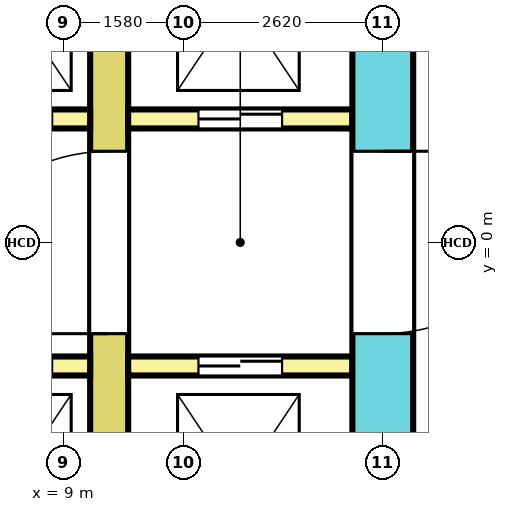
"""IFC4 building model, lengths in metres.
Left out: names, types, materials, properties, quantities, classifications, styles, units other than length and angle.
Written with IfcOpenShell. Run it as: python <this file> out.ifc"""

import sys

from ifc_helpers import new_model, si_unit, direction, frame, frame_2d, origin, place, context, subcontext, project, spatial, rectangle, extrude, element, fill, save


model = new_model("IFC4")
c1 = context("Model", 3, precision=1e-05, world=origin(), true_north=direction((0.0, 1.0)))
c2 = subcontext(c1, "Body", "Model", "MODEL_VIEW")
j1 = project(units=[si_unit("LENGTHUNIT", "METRE"), si_unit("PLANEANGLEUNIT", "RADIAN")], contexts=[c1])
p1 = place(None, origin())
s1 = spatial("IfcSite", under=j1, at=p1, CompositionType="ELEMENT")
p2 = place(p1, origin())
s2 = spatial("IfcBuilding", under=s1, at=p2, CompositionType="ELEMENT")
p3 = place(p2, frame((0.0, 0.0, 107.2)))
s3 = spatial("IfcBuildingStorey", under=s2, at=p3, CompositionType="ELEMENT", Elevation=107.2)
p4 = place(p3, frame((13.2, -10.4, 0.0), z_axis=(0.0, 0.0, 1.0), x_axis=(0.0, 1.0, 0.0)))
e1 = element("IfcWall", 1, at=p4, inside=s3, PredefinedType="SHEAR", context=c2, shape_type="SweptSolid", body=[
    extrude(rectangle(XDim=20.8, YDim=0.8, at=frame_2d((10.4, 0.0))), origin(), (0.0, 0.0, 1.0), 5.7),
])
p5 = place(p4, frame((9.2, 0.0, 0.0)))
e2 = element("IfcOpeningElement", 2, at=p5, cuts=e1, PredefinedType="OPENING", context=c2, shape_type="SweptSolid", body=[
    extrude(rectangle(XDim=2.4, YDim=2.1, at=frame_2d((1.2, 1.05))), frame((0.0, 0.41, 0.0), z_axis=(0.0, -1.0, 0.0), x_axis=(1.0, 0.0, 0.0)), (0.0, 0.0, 1.0), 0.82),
])
p6 = place(p4, frame((16.1, 0.0, 0.0)))
e3 = element("IfcOpeningElement", 3, at=p6, cuts=e1, PredefinedType="OPENING", context=c2, shape_type="SweptSolid", body=[
    extrude(rectangle(XDim=1.2, YDim=2.1, at=frame_2d((0.6, 1.05))), frame((0.0, 0.41, 0.0), z_axis=(0.0, -1.0, 0.0), x_axis=(1.0, 0.0, 0.0)), (0.0, 0.0, 1.0), 0.82),
])
p7 = place(p4, frame((2.869, 0.0, 0.0)))
e4 = element("IfcOpeningElement", 4, at=p7, cuts=e1, PredefinedType="OPENING", context=c2, shape_type="SweptSolid", body=[
    extrude(rectangle(XDim=1.0, YDim=2.1, at=frame_2d((0.5, 1.05))), frame((0.0, 0.41, 0.0), z_axis=(0.0, -1.0, 0.0), x_axis=(1.0, 0.0, 0.0)), (0.0, 0.0, 1.0), 0.82),
])
p8 = place(p4, frame((4.331, 0.0, 0.0)))
e5 = element("IfcOpeningElement", 5, at=p8, cuts=e1, PredefinedType="OPENING", context=c2, shape_type="SweptSolid", body=[
    extrude(rectangle(XDim=1.0, YDim=2.1, at=frame_2d((0.5, 1.05))), frame((0.0, 0.41, 0.0), z_axis=(0.0, -1.0, 0.0), x_axis=(1.0, 0.0, 0.0)), (0.0, 0.0, 1.0), 0.82),
])
p9 = place(p3, frame((9.6, -7.7, 0.0), z_axis=(0.0, 0.0, 1.0), x_axis=(0.0, 1.0, 0.0)))
e6 = element("IfcWall", 6, at=p9, inside=s3, PredefinedType="SHEAR", context=c2, shape_type="SweptSolid", body=[
    extrude(rectangle(XDim=15.4, YDim=0.5, at=frame_2d((7.7, 0.0))), origin(), (0.0, 0.0, 1.0), 5.7),
])
p10 = place(p9, frame((6.5, 0.0, 0.0)))
e7 = element("IfcOpeningElement", 7, at=p10, cuts=e6, PredefinedType="OPENING", context=c2, shape_type="SweptSolid", body=[
    extrude(rectangle(XDim=2.4, YDim=2.1, at=frame_2d((1.2, 1.05))), frame((0.0, 0.26, 0.0), z_axis=(0.0, -1.0, 0.0), x_axis=(1.0, 0.0, 0.0)), (0.0, 0.0, 1.0), 0.52),
])
p11 = place(p9, frame((13.4, 0.0, 0.0)))
e8 = element("IfcOpeningElement", 8, at=p11, cuts=e6, PredefinedType="OPENING", context=c2, shape_type="SweptSolid", body=[
    extrude(rectangle(XDim=1.2, YDim=2.1, at=frame_2d((0.6, 1.05))), frame((0.0, 0.26, 0.0), z_axis=(0.0, -1.0, 0.0), x_axis=(1.0, 0.0, 0.0)), (0.0, 0.0, 1.0), 0.52),
])
p12 = place(p9, frame((0.9, 0.0, 0.0)))
e9 = element("IfcOpeningElement", 9, at=p12, cuts=e6, PredefinedType="OPENING", context=c2, shape_type="SweptSolid", body=[
    extrude(rectangle(XDim=1.0, YDim=2.1, at=frame_2d((0.5, 1.05))), frame((0.0, 0.26, 0.0), z_axis=(0.0, -1.0, 0.0), x_axis=(1.0, 0.0, 0.0)), (0.0, 0.0, 1.0), 0.52),
])
p13 = place(p3, frame((-9.35, 1.625, 0.0), z_axis=(0.0, 0.0, 1.0), x_axis=(1.0, 0.0, 0.0)))
e10 = element("IfcWall", 10, at=p13, inside=s3, PredefinedType="SOLIDWALL", context=c2, shape_type="SweptSolid", body=[
    extrude(rectangle(XDim=18.7, YDim=0.25, at=frame_2d((9.35, 0.0))), origin(), (0.0, 0.0, 1.0), 5.7),
])
p14 = place(p13, frame((0.5, 0.0, 0.0)))
e11 = element("IfcOpeningElement", 11, at=p14, cuts=e10, PredefinedType="OPENING", context=c2, shape_type="SweptSolid", body=[
    extrude(rectangle(XDim=1.1, YDim=2.1, at=frame_2d((0.55, 1.05))), frame((0.0, 0.135, 0.0), z_axis=(0.0, -1.0, 0.0), x_axis=(1.0, 0.0, 0.0)), (0.0, 0.0, 1.0), 0.27),
])
p15 = place(p13, frame((2.85, 0.0, 0.0)))
e12 = element("IfcOpeningElement", 12, at=p15, cuts=e10, PredefinedType="OPENING", context=c2, shape_type="SweptSolid", body=[
    extrude(rectangle(XDim=1.1, YDim=2.1, at=frame_2d((0.55, 1.05))), frame((0.0, 0.135, 0.0), z_axis=(0.0, -1.0, 0.0), x_axis=(1.0, 0.0, 0.0)), (0.0, 0.0, 1.0), 0.27),
])
p16 = place(p13, frame((5.15, 0.0, 0.0)))
e13 = element("IfcOpeningElement", 13, at=p16, cuts=e10, PredefinedType="OPENING", context=c2, shape_type="SweptSolid", body=[
    extrude(rectangle(XDim=1.1, YDim=2.1, at=frame_2d((0.55, 1.05))), frame((0.0, 0.135, 0.0), z_axis=(0.0, -1.0, 0.0), x_axis=(1.0, 0.0, 0.0)), (0.0, 0.0, 1.0), 0.27),
])
p17 = place(p13, frame((7.65, 0.0, 0.0)))
e14 = element("IfcOpeningElement", 14, at=p17, cuts=e10, PredefinedType="OPENING", context=c2, shape_type="SweptSolid", body=[
    extrude(rectangle(XDim=1.1, YDim=2.1, at=frame_2d((0.55, 1.05))), frame((0.0, 0.135, 0.0), z_axis=(0.0, -1.0, 0.0), x_axis=(1.0, 0.0, 0.0)), (0.0, 0.0, 1.0), 0.27),
])
p18 = place(p13, frame((9.95, 0.0, 0.0)))
e15 = element("IfcOpeningElement", 15, at=p18, cuts=e10, PredefinedType="OPENING", context=c2, shape_type="SweptSolid", body=[
    extrude(rectangle(XDim=1.1, YDim=2.1, at=frame_2d((0.55, 1.05))), frame((0.0, 0.135, 0.0), z_axis=(0.0, -1.0, 0.0), x_axis=(1.0, 0.0, 0.0)), (0.0, 0.0, 1.0), 0.27),
])
p19 = place(p13, frame((12.4, 0.0, 0.0)))
e16 = element("IfcOpeningElement", 16, at=p19, cuts=e10, PredefinedType="OPENING", context=c2, shape_type="SweptSolid", body=[
    extrude(rectangle(XDim=1.1, YDim=2.1, at=frame_2d((0.55, 1.05))), frame((0.0, 0.135, 0.0), z_axis=(0.0, -1.0, 0.0), x_axis=(1.0, 0.0, 0.0)), (0.0, 0.0, 1.0), 0.27),
])
p20 = place(p13, frame((14.8, 0.0, 0.0)))
e17 = element("IfcOpeningElement", 17, at=p20, cuts=e10, PredefinedType="OPENING", context=c2, shape_type="SweptSolid", body=[
    extrude(rectangle(XDim=1.1, YDim=2.1, at=frame_2d((0.55, 1.05))), frame((0.0, 0.135, 0.0), z_axis=(0.0, -1.0, 0.0), x_axis=(1.0, 0.0, 0.0)), (0.0, 0.0, 1.0), 0.27),
])
p21 = place(p13, frame((17.1, 0.0, 0.0)))
e18 = element("IfcOpeningElement", 18, at=p21, cuts=e10, PredefinedType="OPENING", context=c2, shape_type="SweptSolid", body=[
    extrude(rectangle(XDim=1.1, YDim=2.1, at=frame_2d((0.55, 1.05))), frame((0.0, 0.135, 0.0), z_axis=(0.0, -1.0, 0.0), x_axis=(1.0, 0.0, 0.0)), (0.0, 0.0, 1.0), 0.27),
])
p22 = place(p3, frame((9.85, 1.625, 0.0), z_axis=(0.0, 0.0, 1.0), x_axis=(1.0, 0.0, 0.0)))
e19 = element("IfcWall", 19, at=p22, inside=s3, PredefinedType="SOLIDWALL", context=c2, shape_type="SweptSolid", body=[
    extrude(rectangle(XDim=2.95, YDim=0.25, at=frame_2d((1.475, 0.0))), origin(), (0.0, 0.0, 1.0), 5.7),
])
p23 = place(p22, frame((0.925, 0.0, 0.0)))
e20 = element("IfcOpeningElement", 20, at=p23, cuts=e19, PredefinedType="OPENING", context=c2, shape_type="SweptSolid", body=[
    extrude(rectangle(XDim=1.1, YDim=2.1, at=frame_2d((0.55, 1.05))), frame((0.0, 0.135, 0.0), z_axis=(0.0, -1.0, 0.0), x_axis=(1.0, 0.0, 0.0)), (0.0, 0.0, 1.0), 0.27),
])
p24 = place(p3, frame((-9.35, -1.625, 0.0), z_axis=(0.0, 0.0, 1.0), x_axis=(1.0, 0.0, 0.0)))
e21 = element("IfcWall", 21, at=p24, inside=s3, PredefinedType="SOLIDWALL", context=c2, shape_type="SweptSolid", body=[
    extrude(rectangle(XDim=18.7, YDim=0.25, at=frame_2d((9.35, 0.0))), origin(), (0.0, 0.0, 1.0), 5.7),
])
p25 = place(p24, frame((0.5, 0.0, 0.0)))
e22 = element("IfcOpeningElement", 22, at=p25, cuts=e21, PredefinedType="OPENING", context=c2, shape_type="SweptSolid", body=[
    extrude(rectangle(XDim=1.1, YDim=2.1, at=frame_2d((0.55, 1.05))), frame((0.0, 0.135, 0.0), z_axis=(0.0, -1.0, 0.0), x_axis=(1.0, 0.0, 0.0)), (0.0, 0.0, 1.0), 0.27),
])
p26 = place(p24, frame((2.85, 0.0, 0.0)))
e23 = element("IfcOpeningElement", 23, at=p26, cuts=e21, PredefinedType="OPENING", context=c2, shape_type="SweptSolid", body=[
    extrude(rectangle(XDim=1.1, YDim=2.1, at=frame_2d((0.55, 1.05))), frame((0.0, 0.135, 0.0), z_axis=(0.0, -1.0, 0.0), x_axis=(1.0, 0.0, 0.0)), (0.0, 0.0, 1.0), 0.27),
])
p27 = place(p24, frame((5.15, 0.0, 0.0)))
e24 = element("IfcOpeningElement", 24, at=p27, cuts=e21, PredefinedType="OPENING", context=c2, shape_type="SweptSolid", body=[
    extrude(rectangle(XDim=1.1, YDim=2.1, at=frame_2d((0.55, 1.05))), frame((0.0, 0.135, 0.0), z_axis=(0.0, -1.0, 0.0), x_axis=(1.0, 0.0, 0.0)), (0.0, 0.0, 1.0), 0.27),
])
p28 = place(p24, frame((7.65, 0.0, 0.0)))
e25 = element("IfcOpeningElement", 25, at=p28, cuts=e21, PredefinedType="OPENING", context=c2, shape_type="SweptSolid", body=[
    extrude(rectangle(XDim=1.1, YDim=2.1, at=frame_2d((0.55, 1.05))), frame((0.0, 0.135, 0.0), z_axis=(0.0, -1.0, 0.0), x_axis=(1.0, 0.0, 0.0)), (0.0, 0.0, 1.0), 0.27),
])
p29 = place(p24, frame((9.95, 0.0, 0.0)))
e26 = element("IfcOpeningElement", 26, at=p29, cuts=e21, PredefinedType="OPENING", context=c2, shape_type="SweptSolid", body=[
    extrude(rectangle(XDim=1.1, YDim=2.1, at=frame_2d((0.55, 1.05))), frame((0.0, 0.135, 0.0), z_axis=(0.0, -1.0, 0.0), x_axis=(1.0, 0.0, 0.0)), (0.0, 0.0, 1.0), 0.27),
])
p30 = place(p24, frame((12.4, 0.0, 0.0)))
e27 = element("IfcOpeningElement", 27, at=p30, cuts=e21, PredefinedType="OPENING", context=c2, shape_type="SweptSolid", body=[
    extrude(rectangle(XDim=1.1, YDim=2.1, at=frame_2d((0.55, 1.05))), frame((0.0, 0.135, 0.0), z_axis=(0.0, -1.0, 0.0), x_axis=(1.0, 0.0, 0.0)), (0.0, 0.0, 1.0), 0.27),
])
p31 = place(p24, frame((14.8, 0.0, 0.0)))
e28 = element("IfcOpeningElement", 28, at=p31, cuts=e21, PredefinedType="OPENING", context=c2, shape_type="SweptSolid", body=[
    extrude(rectangle(XDim=1.1, YDim=2.1, at=frame_2d((0.55, 1.05))), frame((0.0, 0.135, 0.0), z_axis=(0.0, -1.0, 0.0), x_axis=(1.0, 0.0, 0.0)), (0.0, 0.0, 1.0), 0.27),
])
p32 = place(p24, frame((17.1, 0.0, 0.0)))
e29 = element("IfcOpeningElement", 29, at=p32, cuts=e21, PredefinedType="OPENING", context=c2, shape_type="SweptSolid", body=[
    extrude(rectangle(XDim=1.1, YDim=2.1, at=frame_2d((0.55, 1.05))), frame((0.0, 0.135, 0.0), z_axis=(0.0, -1.0, 0.0), x_axis=(1.0, 0.0, 0.0)), (0.0, 0.0, 1.0), 0.27),
])
p33 = place(p3, frame((9.85, -1.625, 0.0), z_axis=(0.0, 0.0, 1.0), x_axis=(1.0, 0.0, 0.0)))
e30 = element("IfcWall", 30, at=p33, inside=s3, PredefinedType="SOLIDWALL", context=c2, shape_type="SweptSolid", body=[
    extrude(rectangle(XDim=2.95, YDim=0.25, at=frame_2d((1.475, 0.0))), origin(), (0.0, 0.0, 1.0), 5.7),
])
p34 = place(p33, frame((0.925, 0.0, 0.0)))
e31 = element("IfcOpeningElement", 31, at=p34, cuts=e30, PredefinedType="OPENING", context=c2, shape_type="SweptSolid", body=[
    extrude(rectangle(XDim=1.1, YDim=2.1, at=frame_2d((0.55, 1.05))), frame((0.0, 0.135, 0.0), z_axis=(0.0, -1.0, 0.0), x_axis=(1.0, 0.0, 0.0)), (0.0, 0.0, 1.0), 0.27),
])
p35 = place(p21, origin())
e32 = element("IfcDoor", 32, at=p35, inside=s3, OperationType="DOUBLE_DOOR_SLIDING", PredefinedType="DOOR", context=c2, shape_type="SweptSolid", body=[
    extrude(rectangle(XDim=1.1, YDim=2.1, at=frame_2d((0.55, 1.05))), frame((0.0, 0.075, 0.0), z_axis=(0.0, -1.0, 0.0), x_axis=(1.0, 0.0, 0.0)), (0.0, 0.0, 1.0), 0.15),
])
fill(e18, e32)
p36 = place(p23, origin())
e33 = element("IfcDoor", 33, at=p36, inside=s3, OperationType="DOUBLE_DOOR_SLIDING", PredefinedType="DOOR", context=c2, shape_type="SweptSolid", body=[
    extrude(rectangle(XDim=1.1, YDim=2.1, at=frame_2d((0.55, 1.05))), frame((0.0, 0.075, 0.0), z_axis=(0.0, -1.0, 0.0), x_axis=(1.0, 0.0, 0.0)), (0.0, 0.0, 1.0), 0.15),
])
fill(e20, e33)
p37 = place(p32, origin())
e34 = element("IfcDoor", 34, at=p37, inside=s3, OperationType="DOUBLE_DOOR_SLIDING", PredefinedType="DOOR", context=c2, shape_type="SweptSolid", body=[
    extrude(rectangle(XDim=1.1, YDim=2.1, at=frame_2d((0.55, 1.05))), frame((0.0, 0.075, 0.0), z_axis=(0.0, -1.0, 0.0), x_axis=(1.0, 0.0, 0.0)), (0.0, 0.0, 1.0), 0.15),
])
fill(e29, e34)
p38 = place(p34, origin())
e35 = element("IfcDoor", 35, at=p38, inside=s3, OperationType="DOUBLE_DOOR_SLIDING", PredefinedType="DOOR", context=c2, shape_type="SweptSolid", body=[
    extrude(rectangle(XDim=1.1, YDim=2.1, at=frame_2d((0.55, 1.05))), frame((0.0, 0.075, 0.0), z_axis=(0.0, -1.0, 0.0), x_axis=(1.0, 0.0, 0.0)), (0.0, 0.0, 1.0), 0.15),
])
fill(e31, e35)
p39 = place(p10, origin())
e36 = element("IfcDoor", 36, at=p39, inside=s3, OperationType="DOUBLE_DOOR_SINGLE_SWING", PredefinedType="DOOR", context=c2, shape_type="SweptSolid", body=[
    extrude(rectangle(XDim=2.4, YDim=2.1, at=frame_2d((1.2, 1.05))), frame((0.0, 0.2, 0.0), z_axis=(0.0, -1.0, 0.0), x_axis=(1.0, 0.0, 0.0)), (0.0, 0.0, 1.0), 0.4),
])
fill(e7, e36)
p40 = place(p5, origin())
e37 = element("IfcDoor", 37, at=p40, inside=s3, OperationType="DOUBLE_DOOR_SINGLE_SWING", PredefinedType="DOOR", context=c2, shape_type="SweptSolid", body=[
    extrude(rectangle(XDim=2.4, YDim=2.1, at=frame_2d((1.2, 1.05))), frame((0.0, 0.3, 0.0), z_axis=(0.0, -1.0, 0.0), x_axis=(1.0, 0.0, 0.0)), (0.0, 0.0, 1.0), 0.6),
])
fill(e2, e37)
save(model, sys.argv[1])
